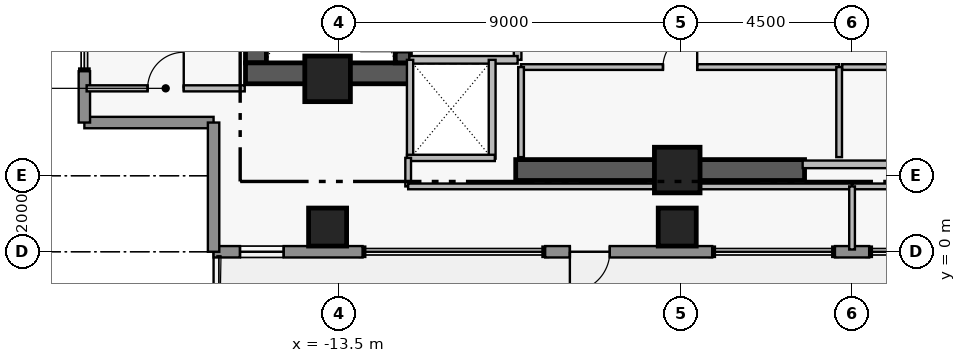
"""IFC4 building model, lengths in metres.
Left out: names, types, materials, properties, quantities, classifications, styles, units other than length and angle.
Written with IfcOpenShell. Run it as: python <this file> out.ifc"""

import sys

from ifc_helpers import new_model, si_unit, direction, frame, frame_2d, origin, origin_2d, place, context, subcontext, project, spatial, rectangle, extrude, element, fill, save


model = new_model("IFC4")
c1 = context("Model", 3, precision=1e-05, world=origin(), true_north=direction((0.0, 1.0)))
c2 = subcontext(c1, "Body", "Model", "MODEL_VIEW")
j1 = project(units=[si_unit("LENGTHUNIT", "METRE"), si_unit("PLANEANGLEUNIT", "RADIAN")], contexts=[c1])
p1 = place(None, origin())
s1 = spatial("IfcSite", under=j1, at=p1, CompositionType="ELEMENT")
p2 = place(p1, origin())
s2 = spatial("IfcBuilding", under=s1, at=p2, CompositionType="ELEMENT")
p3 = place(p2, frame((0.0, 0.0, 272.95)))
s3 = spatial("IfcBuildingStorey", under=s2, at=p3, CompositionType="ELEMENT", Elevation=272.95)
p4 = place(p3, frame((-15.685, 4.97, 0.0), z_axis=(0.0, 0.0, 1.0), x_axis=(0.0, 1.0, 0.0)))
e1 = element("IfcWall", 1, at=p4, inside=s3, PredefinedType="SHEAR", context=c2, shape_type="SweptSolid", body=[
    extrude(rectangle(XDim=8.96, YDim=0.55, at=frame_2d((4.48, 0.0))), origin(), (0.0, 0.0, 1.0), 3.51),
])
p5 = place(p3, frame((-15.96, 4.695, 0.0), z_axis=(0.0, 0.0, 1.0), x_axis=(1.0, 0.0, 0.0)))
e2 = element("IfcWall", 2, at=p5, inside=s3, PredefinedType="SHEAR", context=c2, shape_type="SweptSolid", body=[
    extrude(rectangle(XDim=4.36, YDim=0.55, at=frame_2d((2.18, 0.0))), origin(), (0.0, 0.0, 1.0), 3.51),
])
p6 = place(p3, frame((-8.85, 2.15, 0.0), z_axis=(0.0, 0.0, 1.0), x_axis=(1.0, 0.0, 0.0)))
e3 = element("IfcWall", 3, at=p6, inside=s3, PredefinedType="SHEAR", context=c2, shape_type="SweptSolid", body=[
    extrude(rectangle(XDim=7.6, YDim=0.55, at=frame_2d((3.8, 0.0))), origin(), (0.0, 0.0, 1.0), 3.48),
])
p7 = place(p3, frame((-11.82, 4.97, 0.0), z_axis=(0.0, 0.0, 1.0), x_axis=(0.0, 1.0, 0.0)))
e4 = element("IfcWall", 4, at=p7, inside=s3, PredefinedType="SHEAR", context=c2, shape_type="SweptSolid", body=[
    extrude(rectangle(XDim=8.96, YDim=0.4, at=frame_2d((4.48, 0.0))), origin(), (0.0, 0.0, 1.0), 3.51),
])
p8 = place(p7, frame((0.31, 0.0, 0.0)))
e5 = element("IfcOpeningElement", 5, at=p8, cuts=e4, PredefinedType="OPENING", context=c2, shape_type="SweptSolid", body=[
    extrude(rectangle(XDim=1.12, YDim=2.22, at=frame_2d((0.56, 1.11))), frame((0.0, 0.21, 0.0), z_axis=(0.0, -1.0, 0.0), x_axis=(1.0, 0.0, 0.0)), (0.0, 0.0, 1.0), 0.42),
])
for number, where, z_axis, x_axis in (
    (6, (-13.8, 4.55, 0.0), (0.0, 0.0, 1.0), (1.0, 0.0, 0.0)),
    (7, (-4.6, 2.15, 0.0), (0.0, 0.0, 1.0), (1.0, 0.0, 0.0)),
):
    element("IfcColumn", number, at=place(p3, frame(where, z_axis=z_axis, x_axis=x_axis)), inside=s3, PredefinedType="COLUMN", context=c2, shape_type="SweptSolid", body=[
        extrude(rectangle(XDim=1.2, YDim=1.2, at=origin_2d()), origin(), (0.0, 0.0, 1.0), 3.7),
    ])
for number, where, z_axis, x_axis in (
    (8, (-13.8, 0.65, 0.0), (0.0, 0.0, 1.0), (1.0, 0.0, 0.0)),
    (9, (-4.6, 0.65, 0.0), (0.0, 0.0, 1.0), (1.0, 0.0, 0.0)),
):
    element("IfcColumn", number, at=place(p3, frame(where, z_axis=z_axis, x_axis=x_axis)), inside=s3, PredefinedType="COLUMN", context=c2, shape_type="SweptSolid", body=[
        extrude(rectangle(XDim=1.0, YDim=1.0, at=origin_2d()), origin(), (0.0, 0.0, 1.0), 3.7),
    ])
p9 = place(p3, frame((-16.8, 3.4, 0.0), z_axis=(0.0, 0.0, 1.0), x_axis=(-1.0, 0.0, 0.0)))
e10 = element("IfcWall", 10, at=p9, inside=s3, PredefinedType="STANDARD", context=c2, shape_type="SweptSolid", body=[
    extrude(rectangle(XDim=3.4, YDim=0.3, at=frame_2d((1.7, 0.0))), origin(), (0.0, 0.0, 1.0), 3.48),
])
p10 = place(p3, frame((-20.2, 3.4, 0.0), z_axis=(0.0, 0.0, 1.0), x_axis=(0.0, 1.0, 0.0)))
e11 = element("IfcWall", 11, at=p10, inside=s3, PredefinedType="STANDARD", context=c2, shape_type="SweptSolid", body=[
    extrude(rectangle(XDim=1.35, YDim=0.3, at=frame_2d((0.675, 0.0))), origin(), (0.0, 0.0, 1.0), 3.48),
])
p11 = place(p3, frame((0.45, 0.0, 0.0), z_axis=(0.0, 0.0, 1.0), x_axis=(-1.0, 0.0, 0.0)))
e12 = element("IfcWall", 12, at=p11, inside=s3, PredefinedType="STANDARD", context=c2, shape_type="SweptSolid", body=[
    extrude(rectangle(XDim=0.9, YDim=0.3, at=frame_2d((0.45, 0.0))), origin(), (0.0, 0.0, 1.0), 3.48),
])
p12 = place(p3, frame((-3.68, 0.0, 0.0), z_axis=(0.0, 0.0, 1.0), x_axis=(-1.0, 0.0, 0.0)))
e13 = element("IfcWall", 13, at=p12, inside=s3, PredefinedType="STANDARD", context=c2, shape_type="SweptSolid", body=[
    extrude(rectangle(XDim=4.395, YDim=0.3, at=frame_2d((2.198, 0.0))), origin(), (0.0, 0.0, 1.0), 3.48),
])
p13 = place(p12, frame((2.695, 0.0, 0.0)))
e14 = element("IfcOpeningElement", 14, at=p13, cuts=e13, PredefinedType="OPENING", context=c2, shape_type="SweptSolid", body=[
    extrude(rectangle(XDim=1.05, YDim=2.2, at=frame_2d((0.525, 1.1))), frame((0.0, 0.16, 0.0), z_axis=(0.0, -1.0, 0.0), x_axis=(1.0, 0.0, 0.0)), (0.0, 0.0, 1.0), 0.32),
])
p14 = place(p3, frame((-12.88, 0.0, 0.0), z_axis=(0.0, 0.0, 1.0), x_axis=(-1.0, 0.0, 0.0)))
e15 = element("IfcWall", 15, at=p14, inside=s3, PredefinedType="STANDARD", context=c2, shape_type="SweptSolid", body=[
    extrude(rectangle(XDim=3.92, YDim=0.3, at=frame_2d((1.96, 0.0))), origin(), (0.0, 0.0, 1.0), 3.48),
])
p15 = place(p14, frame((2.075, 0.0, 0.95)))
e16 = element("IfcOpeningElement", 16, at=p15, cuts=e15, PredefinedType="OPENING", context=c2, shape_type="SweptSolid", body=[
    extrude(rectangle(XDim=1.15, YDim=1.55, at=frame_2d((0.575, 0.775))), frame((0.0, 0.16, 0.0), z_axis=(0.0, -1.0, 0.0), x_axis=(1.0, 0.0, 0.0)), (0.0, 0.0, 1.0), 0.32),
])
p16 = place(p3, frame((-16.8, 0.0, 0.0), z_axis=(0.0, 0.0, 1.0), x_axis=(0.0, 1.0, 0.0)))
e17 = element("IfcWall", 17, at=p16, inside=s3, PredefinedType="STANDARD", context=c2, shape_type="SweptSolid", body=[
    extrude(rectangle(XDim=3.4, YDim=0.3, at=frame_2d((1.7, 0.0))), origin(), (0.0, 0.0, 1.0), 3.48),
])
p17 = place(p3, frame((-8.8, 5.05, 0.0), z_axis=(0.0, 0.0, 1.0), x_axis=(0.0, 1.0, 0.0)))
e18 = element("IfcWall", 18, at=p17, inside=s3, PredefinedType="PARTITIONING", context=c2, shape_type="SweptSolid", body=[
    extrude(rectangle(XDim=6.1, YDim=0.2, at=frame_2d((3.05, 0.0))), origin(), (0.0, 0.0, 1.0), 3.48),
])
p18 = place(p17, frame((0.25, 0.0, 0.0)))
e19 = element("IfcOpeningElement", 19, at=p18, cuts=e18, PredefinedType="OPENING", context=c2, shape_type="SweptSolid", body=[
    extrude(rectangle(XDim=1.1, YDim=2.2, at=frame_2d((0.55, 1.1))), frame((0.0, 0.11, 0.0), z_axis=(0.0, -1.0, 0.0), x_axis=(1.0, 0.0, 0.0)), (0.0, 0.0, 1.0), 0.22),
])
p19 = place(p17, frame((3.85, 0.0, 0.0)))
e20 = element("IfcOpeningElement", 20, at=p19, cuts=e18, PredefinedType="OPENING", context=c2, shape_type="SweptSolid", body=[
    extrude(rectangle(XDim=1.1, YDim=2.2, at=frame_2d((0.55, 1.1))), frame((0.0, 0.11, 0.0), z_axis=(0.0, -1.0, 0.0), x_axis=(1.0, 0.0, 0.0)), (0.0, 0.0, 1.0), 0.22),
])
p20 = place(p3, frame((-8.71, 4.86, 0.0), z_axis=(0.0, 0.0, 1.0), x_axis=(1.0, 0.0, 0.0)))
e21 = element("IfcWall", 21, at=p20, inside=s3, PredefinedType="PARTITIONING", context=c2, shape_type="SweptSolid", body=[
    extrude(rectangle(XDim=8.37, YDim=0.15, at=frame_2d((4.185, 0.0))), origin(), (0.0, 0.0, 1.0), 3.48),
])
p21 = place(p20, frame((3.735, 0.0, 0.0)))
e22 = element("IfcOpeningElement", 22, at=p21, cuts=e21, PredefinedType="OPENING", context=c2, shape_type="SweptSolid", body=[
    extrude(rectangle(XDim=0.9, YDim=2.15, at=frame_2d((0.45, 1.075))), frame((0.0, 0.085, 0.0), z_axis=(0.0, -1.0, 0.0), x_axis=(1.0, 0.0, 0.0)), (0.0, 0.0, 1.0), 0.17),
])
p22 = place(p3, frame((-0.26, 4.86, 0.0), z_axis=(0.0, 0.0, 1.0), x_axis=(1.0, 0.0, 0.0)))
e23 = element("IfcWall", 23, at=p22, inside=s3, PredefinedType="PARTITIONING", context=c2, shape_type="SweptSolid", body=[
    extrude(rectangle(XDim=3.97, YDim=0.15, at=frame_2d((1.985, 0.0))), origin(), (0.0, 0.0, 1.0), 3.48),
])
p23 = place(p22, frame((1.535, 0.0, 0.0)))
e24 = element("IfcOpeningElement", 24, at=p23, cuts=e23, PredefinedType="OPENING", context=c2, shape_type="SweptSolid", body=[
    extrude(rectangle(XDim=0.9, YDim=2.15, at=frame_2d((0.45, 1.075))), frame((0.0, 0.085, 0.0), z_axis=(0.0, -1.0, 0.0), x_axis=(1.0, 0.0, 0.0)), (0.0, 0.0, 1.0), 0.17),
])
p24 = place(p3, frame((-20.14, 4.3, 0.0), z_axis=(0.0, 0.0, 1.0), x_axis=(1.0, 0.0, 0.0)))
e25 = element("IfcWall", 25, at=p24, inside=s3, PredefinedType="PARTITIONING", context=c2, shape_type="SweptSolid", body=[
    extrude(rectangle(XDim=4.16, YDim=0.16, at=frame_2d((2.08, 0.0))), origin(), (0.0, 0.0, 1.0), 3.48),
])
p25 = place(p24, frame((1.605, 0.0, 0.0)))
e26 = element("IfcOpeningElement", 26, at=p25, cuts=e25, PredefinedType="OPENING", context=c2, shape_type="SweptSolid", body=[
    extrude(rectangle(XDim=0.95, YDim=2.15, at=frame_2d((0.475, 1.075))), frame((0.0, 0.09, 0.0), z_axis=(0.0, -1.0, 0.0), x_axis=(1.0, 0.0, 0.0)), (0.0, 0.0, 1.0), 0.18),
])
p26 = place(p3, frame((-11.65, 5.05, 0.0), z_axis=(0.0, 0.0, 1.0), x_axis=(1.0, 0.0, 0.0)))
e27 = element("IfcWall", 27, at=p26, inside=s3, PredefinedType="PARTITIONING", context=c2, shape_type="SweptSolid", body=[
    extrude(rectangle(XDim=2.85, YDim=0.2, at=frame_2d((1.425, 0.0))), origin(), (0.0, 0.0, 1.0), 3.48),
])
p27 = place(p3, frame((-1.3, 2.3, 0.0), z_axis=(0.0, 0.0, 1.0), x_axis=(1.0, 0.0, 0.0)))
e28 = element("IfcWall", 28, at=p27, inside=s3, PredefinedType="PARTITIONING", context=c2, shape_type="SweptSolid", body=[
    extrude(rectangle(XDim=2.6, YDim=0.2, at=frame_2d((1.3, 0.0))), origin(), (0.0, 0.0, 1.0), 2.38),
])
for number, where, z_axis, x_axis in (
    (29, (-8.71, 2.49, 0.0), (0.0, 0.0, 1.0), (0.0, 1.0, 0.0)),
    (30, (-0.34, 2.49, 0.0), (0.0, 0.0, 1.0), (0.0, 1.0, 0.0)),
):
    element("IfcWall", number, at=place(p3, frame(where, z_axis=z_axis, x_axis=x_axis)), inside=s3, PredefinedType="PARTITIONING", context=c2, shape_type="SweptSolid", body=[
        extrude(rectangle(XDim=2.37, YDim=0.15, at=frame_2d((1.185, 0.0))), origin(), (0.0, 0.0, 1.0), 3.48),
    ])
p28 = place(p3, frame((-9.47, 2.45, 0.0), z_axis=(0.0, 0.0, 1.0), x_axis=(0.0, 1.0, 0.0)))
e31 = element("IfcWall", 31, at=p28, inside=s3, PredefinedType="PARTITIONING", context=c2, shape_type="SweptSolid", body=[
    extrude(rectangle(XDim=2.6, YDim=0.18, at=frame_2d((1.3, 0.0))), origin(), (0.0, 0.0, 1.0), 3.48),
])
p29 = place(p3, frame((-11.63, 2.47, 0.0), z_axis=(0.0, 0.0, 1.0), x_axis=(0.0, 1.0, 0.0)))
e32 = element("IfcWall", 32, at=p29, inside=s3, PredefinedType="PARTITIONING", context=c2, shape_type="SweptSolid", body=[
    extrude(rectangle(XDim=2.58, YDim=0.165, at=frame_2d((1.29, 0.0))), origin(), (0.0, 0.0, 1.0), 3.48),
])
p30 = place(p3, frame((-11.71, 2.47, 0.0), z_axis=(0.0, 0.0, 1.0), x_axis=(1.0, 0.0, 0.0)))
e33 = element("IfcWall", 33, at=p30, inside=s3, PredefinedType="PARTITIONING", context=c2, shape_type="SweptSolid", body=[
    extrude(rectangle(XDim=2.31, YDim=0.165, at=frame_2d((1.155, 0.0))), origin(), (0.0, 0.0, 1.0), 2.38),
])
p31 = place(p3, frame((-11.68, 1.72, 0.0), z_axis=(0.0, 0.0, 1.0), x_axis=(0.0, 1.0, 0.0)))
e34 = element("IfcWall", 34, at=p31, inside=s3, PredefinedType="PARTITIONING", context=c2, shape_type="SweptSolid", body=[
    extrude(rectangle(XDim=0.75, YDim=0.15, at=frame_2d((0.375, 0.0))), origin(), (0.0, 0.0, 1.0), 3.48),
])
for number, where, z_axis, x_axis in (
    (35, (-11.68, 1.72, 0.0), (0.0, 0.0, 1.0), (1.0, 0.0, 0.0)),
    (36, (0.0, 1.72, 0.0), (0.0, 0.0, 1.0), (1.0, 0.0, 0.0)),
):
    element("IfcWall", number, at=place(p3, frame(where, z_axis=z_axis, x_axis=x_axis)), inside=s3, PredefinedType="PARTITIONING", context=c2, shape_type="SweptSolid", body=[
        extrude(rectangle(XDim=11.68, YDim=0.15, at=frame_2d((5.84, 0.0))), origin(), (0.0, 0.0, 1.0), 2.38),
    ])
p32 = place(p3, frame((0.0, 0.06, 0.0), z_axis=(0.0, 0.0, 1.0), x_axis=(0.0, 1.0, 0.0)))
e37 = element("IfcWall", 37, at=p32, inside=s3, PredefinedType="PARTITIONING", context=c2, shape_type="SweptSolid", body=[
    extrude(rectangle(XDim=1.66, YDim=0.15, at=frame_2d((0.83, 0.0))), origin(), (0.0, 0.0, 1.0), 3.48),
])
p33 = place(p13, origin())
e38 = element("IfcDoor", 38, at=p33, inside=s3, OperationType="SINGLE_SWING_RIGHT", PredefinedType="DOOR", context=c2, shape_type="SweptSolid", body=[
    extrude(rectangle(XDim=1.05, YDim=2.2, at=frame_2d((0.525, 1.1))), frame((0.0, 0.025, 0.0), z_axis=(0.0, -1.0, 0.0), x_axis=(1.0, 0.0, 0.0)), (0.0, 0.0, 1.0), 0.05),
])
fill(e14, e38)
p34 = place(p15, origin())
e39 = element("IfcWindow", 39, at=p34, inside=s3, PartitioningType="SINGLE_PANEL", PredefinedType="WINDOW", context=c2, shape_type="SweptSolid", body=[
    extrude(rectangle(XDim=1.15, YDim=1.55, at=frame_2d((0.575, 0.775))), frame((0.0, 0.03, 0.0), z_axis=(0.0, -1.0, 0.0), x_axis=(1.0, 0.0, 0.0)), (0.0, 0.0, 1.0), 0.06),
])
fill(e16, e39)
p35 = place(p21, origin())
e40 = element("IfcDoor", 40, at=p35, inside=s3, OperationType="SINGLE_SWING_RIGHT", PredefinedType="DOOR", context=c2, shape_type="SweptSolid", body=[
    extrude(rectangle(XDim=0.9, YDim=2.15, at=frame_2d((0.45, 1.075))), frame((0.0, 0.025, 0.0), z_axis=(0.0, -1.0, 0.0), x_axis=(1.0, 0.0, 0.0)), (0.0, 0.0, 1.0), 0.05),
])
fill(e22, e40)
p36 = place(p25, origin())
e41 = element("IfcDoor", 41, at=p36, inside=s3, OperationType="SINGLE_SWING_RIGHT", PredefinedType="DOOR", context=c2, shape_type="SweptSolid", body=[
    extrude(rectangle(XDim=0.95, YDim=2.15, at=frame_2d((0.475, 1.075))), frame((0.0, 0.025, 0.0), z_axis=(0.0, -1.0, 0.0), x_axis=(1.0, 0.0, 0.0)), (0.0, 0.0, 1.0), 0.05),
])
fill(e26, e41)
save(model, sys.argv[1])
